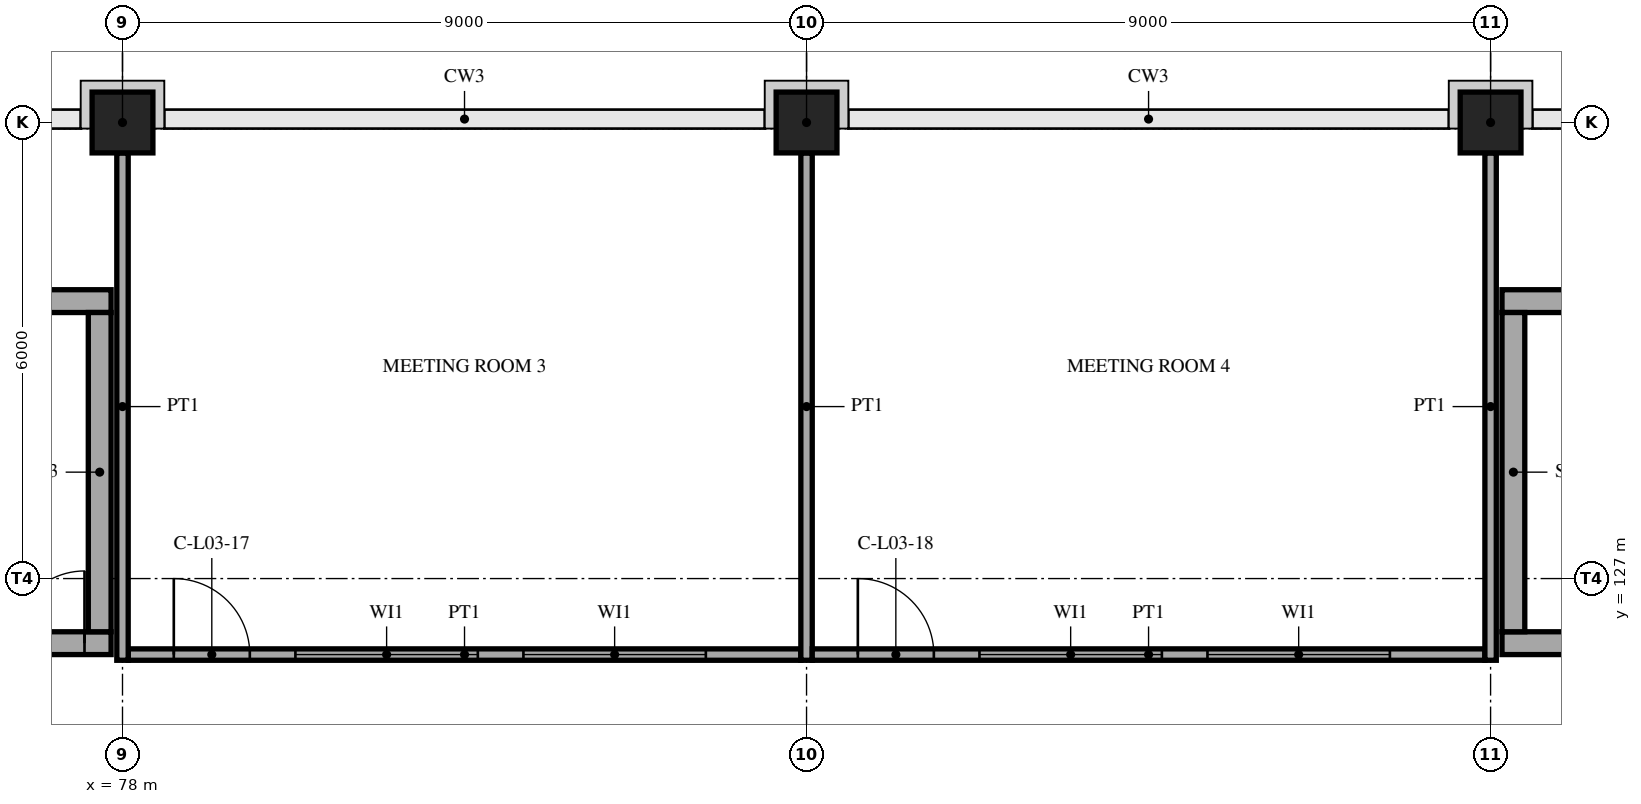
"""IFC4 building model, lengths in metres.
Left out: names, types, materials, properties, quantities, classifications, styles, units other than length and angle.
Written with IfcOpenShell. Run it as: python <this file> out.ifc"""

import sys

from ifc_helpers import new_model, si_unit, direction, frame, frame_2d, origin, origin_2d, place, context, subcontext, project, spatial, rectangle, extrude, element, fill, save


model = new_model("IFC4")
c1 = context("Model", 3, precision=1e-05, world=origin(), true_north=direction((0.0, 1.0)))
c2 = subcontext(c1, "Body", "Model", "MODEL_VIEW")
j1 = project(units=[si_unit("LENGTHUNIT", "METRE"), si_unit("PLANEANGLEUNIT", "RADIAN")], contexts=[c1])
p1 = place(None, origin())
s1 = spatial("IfcSite", under=j1, at=p1, CompositionType="ELEMENT")
p2 = place(p1, origin())
s2 = spatial("IfcBuilding", under=s1, at=p2, CompositionType="ELEMENT")
p3 = place(p2, frame((0.0, 0.0, 15.0)))
s3 = spatial("IfcBuildingStorey", under=s2, at=p3, CompositionType="ELEMENT", Elevation=15.0)
for number, where, z_axis, x_axis in (
    (1, (78.0, 133.0, 0.0), (0.0, 0.0, 1.0), (1.0, 0.0, 0.0)),
    (2, (87.0, 133.0, 0.0), (0.0, 0.0, 1.0), (1.0, 0.0, 0.0)),
    (3, (96.0, 133.0, 0.0), (0.0, 0.0, 1.0), (1.0, 0.0, 0.0)),
):
    element("IfcColumn", number, at=place(p3, frame(where, z_axis=z_axis, x_axis=x_axis)), inside=s3, PredefinedType="COLUMN", context=c2, shape_type="SweptSolid", body=[
        extrude(rectangle(XDim=0.8, YDim=0.8, at=origin_2d()), origin(), (0.0, 0.0, 1.0), 4.2),
    ])
p4 = place(p3, frame((69.15, 126.15, 0.0), z_axis=(0.0, 0.0, 1.0), x_axis=(1.0, 0.0, 0.0)))
e4 = element("IfcWall", 4, at=p4, inside=s3, PredefinedType="SHEAR", context=c2, shape_type="SweptSolid", body=[
    extrude(rectangle(XDim=8.7, YDim=0.3, at=frame_2d((4.35, 0.0))), origin(), (0.0, 0.0, 1.0), 4.2),
])
p5 = place(p4, frame((6.45, 0.0, 0.0)))
e5 = element("IfcOpeningElement", 5, at=p5, cuts=e4, PredefinedType="OPENING", context=c2, shape_type="SweptSolid", body=[
    extrude(rectangle(XDim=1.9, YDim=2.1, at=frame_2d((0.95, 1.05))), frame((0.0, 0.16, 0.0), z_axis=(0.0, -1.0, 0.0), x_axis=(1.0, 0.0, 0.0)), (0.0, 0.0, 1.0), 0.32),
])
p6 = place(p3, frame((69.15, 130.65, 0.0), z_axis=(0.0, 0.0, 1.0), x_axis=(1.0, 0.0, 0.0)))
e6 = element("IfcWall", 6, at=p6, inside=s3, PredefinedType="SHEAR", context=c2, shape_type="SweptSolid", body=[
    extrude(rectangle(XDim=8.7, YDim=0.3, at=frame_2d((4.35, 0.0))), origin(), (0.0, 0.0, 1.0), 4.2),
])
p7 = place(p3, frame((77.7, 126.3, 0.0), z_axis=(0.0, 0.0, 1.0), x_axis=(0.0, 1.0, 0.0)))
e7 = element("IfcWall", 7, at=p7, inside=s3, PredefinedType="SHEAR", context=c2, shape_type="SweptSolid", body=[
    extrude(rectangle(XDim=4.2, YDim=0.3, at=frame_2d((2.1, 0.0))), origin(), (0.0, 0.0, 1.0), 4.2),
])
p8 = place(p3, frame((96.15, 126.15, 0.0), z_axis=(0.0, 0.0, 1.0), x_axis=(1.0, 0.0, 0.0)))
e8 = element("IfcWall", 8, at=p8, inside=s3, PredefinedType="SHEAR", context=c2, shape_type="SweptSolid", body=[
    extrude(rectangle(XDim=8.2, YDim=0.3, at=frame_2d((4.1, 0.0))), origin(), (0.0, 0.0, 1.0), 4.2),
])
p9 = place(p8, frame((5.95, 0.0, 0.0)))
e9 = element("IfcOpeningElement", 9, at=p9, cuts=e8, PredefinedType="OPENING", context=c2, shape_type="SweptSolid", body=[
    extrude(rectangle(XDim=1.9, YDim=2.1, at=frame_2d((0.95, 1.05))), frame((0.0, 0.16, 0.0), z_axis=(0.0, -1.0, 0.0), x_axis=(1.0, 0.0, 0.0)), (0.0, 0.0, 1.0), 0.32),
])
p10 = place(p3, frame((96.15, 130.65, 0.0), z_axis=(0.0, 0.0, 1.0), x_axis=(1.0, 0.0, 0.0)))
e10 = element("IfcWall", 10, at=p10, inside=s3, PredefinedType="SHEAR", context=c2, shape_type="SweptSolid", body=[
    extrude(rectangle(XDim=8.2, YDim=0.3, at=frame_2d((4.1, 0.0))), origin(), (0.0, 0.0, 1.0), 4.2),
])
p11 = place(p3, frame((96.3, 126.3, 0.0), z_axis=(0.0, 0.0, 1.0), x_axis=(0.0, 1.0, 0.0)))
e11 = element("IfcWall", 11, at=p11, inside=s3, PredefinedType="SHEAR", context=c2, shape_type="SweptSolid", body=[
    extrude(rectangle(XDim=4.2, YDim=0.3, at=frame_2d((2.1, 0.0))), origin(), (0.0, 0.0, 1.0), 4.2),
])
p12 = place(p3, frame((78.075, 126.0, 0.0), z_axis=(0.0, 0.0, 1.0), x_axis=(1.0, 0.0, 0.0)))
e12 = element("IfcWall", 12, at=p12, inside=s3, PredefinedType="PARTITIONING", context=c2, shape_type="SweptSolid", body=[
    extrude(rectangle(XDim=8.85, YDim=0.15, at=frame_2d((4.425, 0.0))), origin(), (0.0, 0.0, 1.0), 4.2),
])
p13 = place(p12, frame((0.6, 0.0, 0.0)))
e13 = element("IfcOpeningElement", 13, at=p13, cuts=e12, PredefinedType="OPENING", context=c2, shape_type="SweptSolid", body=[
    extrude(rectangle(XDim=1.0, YDim=2.1, at=frame_2d((0.5, 1.05))), frame((0.0, 0.085, 0.0), z_axis=(0.0, -1.0, 0.0), x_axis=(1.0, 0.0, 0.0)), (0.0, 0.0, 1.0), 0.17),
])
p14 = place(p12, frame((2.2, 0.0, 0.9)))
e14 = element("IfcOpeningElement", 14, at=p14, cuts=e12, PredefinedType="OPENING", context=c2, shape_type="SweptSolid", body=[
    extrude(rectangle(XDim=2.4, YDim=1.5, at=frame_2d((1.2, 0.75))), frame((0.0, 0.085, 0.0), z_axis=(0.0, -1.0, 0.0), x_axis=(1.0, 0.0, 0.0)), (0.0, 0.0, 1.0), 0.17),
])
p15 = place(p12, frame((5.2, 0.0, 0.9)))
e15 = element("IfcOpeningElement", 15, at=p15, cuts=e12, PredefinedType="OPENING", context=c2, shape_type="SweptSolid", body=[
    extrude(rectangle(XDim=2.4, YDim=1.5, at=frame_2d((1.2, 0.75))), frame((0.0, 0.085, 0.0), z_axis=(0.0, -1.0, 0.0), x_axis=(1.0, 0.0, 0.0)), (0.0, 0.0, 1.0), 0.17),
])
for number, where, z_axis, x_axis in (
    (16, (78.0, 125.925, 0.0), (0.0, 0.0, 1.0), (0.0, 1.0, 0.0)),
    (17, (87.0, 125.925, 0.0), (0.0, 0.0, 1.0), (0.0, 1.0, 0.0)),
):
    element("IfcWall", number, at=place(p3, frame(where, z_axis=z_axis, x_axis=x_axis)), inside=s3, PredefinedType="PARTITIONING", context=c2, shape_type="SweptSolid", body=[
        extrude(rectangle(XDim=6.675, YDim=0.15, at=frame_2d((3.337, 0.0))), origin(), (0.0, 0.0, 1.0), 4.2),
    ])
p16 = place(p3, frame((87.075, 126.0, 0.0), z_axis=(0.0, 0.0, 1.0), x_axis=(1.0, 0.0, 0.0)))
e18 = element("IfcWall", 18, at=p16, inside=s3, PredefinedType="PARTITIONING", context=c2, shape_type="SweptSolid", body=[
    extrude(rectangle(XDim=8.85, YDim=0.15, at=frame_2d((4.425, 0.0))), origin(), (0.0, 0.0, 1.0), 4.2),
])
p17 = place(p16, frame((0.6, 0.0, 0.0)))
e19 = element("IfcOpeningElement", 19, at=p17, cuts=e18, PredefinedType="OPENING", context=c2, shape_type="SweptSolid", body=[
    extrude(rectangle(XDim=1.0, YDim=2.1, at=frame_2d((0.5, 1.05))), frame((0.0, 0.085, 0.0), z_axis=(0.0, -1.0, 0.0), x_axis=(1.0, 0.0, 0.0)), (0.0, 0.0, 1.0), 0.17),
])
p18 = place(p16, frame((2.2, 0.0, 0.9)))
e20 = element("IfcOpeningElement", 20, at=p18, cuts=e18, PredefinedType="OPENING", context=c2, shape_type="SweptSolid", body=[
    extrude(rectangle(XDim=2.4, YDim=1.5, at=frame_2d((1.2, 0.75))), frame((0.0, 0.085, 0.0), z_axis=(0.0, -1.0, 0.0), x_axis=(1.0, 0.0, 0.0)), (0.0, 0.0, 1.0), 0.17),
])
p19 = place(p16, frame((5.2, 0.0, 0.9)))
e21 = element("IfcOpeningElement", 21, at=p19, cuts=e18, PredefinedType="OPENING", context=c2, shape_type="SweptSolid", body=[
    extrude(rectangle(XDim=2.4, YDim=1.5, at=frame_2d((1.2, 0.75))), frame((0.0, 0.085, 0.0), z_axis=(0.0, -1.0, 0.0), x_axis=(1.0, 0.0, 0.0)), (0.0, 0.0, 1.0), 0.17),
])
p20 = place(p3, frame((96.0, 125.925, 0.0), z_axis=(0.0, 0.0, 1.0), x_axis=(0.0, 1.0, 0.0)))
e22 = element("IfcWall", 22, at=p20, inside=s3, PredefinedType="PARTITIONING", context=c2, shape_type="SweptSolid", body=[
    extrude(rectangle(XDim=6.675, YDim=0.15, at=frame_2d((3.337, 0.0))), origin(), (0.0, 0.0, 1.0), 4.2),
])
p21 = place(p5, origin())
e23 = element("IfcDoor", 23, at=p21, inside=s3, OperationType="DOUBLE_DOOR_SINGLE_SWING", PredefinedType="NOTDEFINED", context=c2, shape_type="SweptSolid", body=[
    extrude(rectangle(XDim=1.9, YDim=2.1, at=frame_2d((0.95, 1.05))), frame((0.0, 0.025, 0.0), z_axis=(0.0, -1.0, 0.0), x_axis=(1.0, 0.0, 0.0)), (0.0, 0.0, 1.0), 0.05),
])
fill(e5, e23)
p22 = place(p13, origin())
e24 = element("IfcDoor", 24, at=p22, inside=s3, OperationType="SINGLE_SWING_LEFT", PredefinedType="NOTDEFINED", context=c2, shape_type="SweptSolid", body=[
    extrude(rectangle(XDim=1.0, YDim=2.1, at=frame_2d((0.5, 1.05))), frame((0.0, 0.025, 0.0), z_axis=(0.0, -1.0, 0.0), x_axis=(1.0, 0.0, 0.0)), (0.0, 0.0, 1.0), 0.05),
])
fill(e13, e24)
p23 = place(p14, origin())
e25 = element("IfcWindow", 25, at=p23, inside=s3, PartitioningType="SINGLE_PANEL", PredefinedType="WINDOW", context=c2, shape_type="SweptSolid", body=[
    extrude(rectangle(XDim=2.4, YDim=1.5, at=frame_2d((1.2, 0.75))), frame((0.0, 0.03, 0.0), z_axis=(0.0, -1.0, 0.0), x_axis=(1.0, 0.0, 0.0)), (0.0, 0.0, 1.0), 0.06),
])
fill(e14, e25)
p24 = place(p15, origin())
e26 = element("IfcWindow", 26, at=p24, inside=s3, PartitioningType="SINGLE_PANEL", PredefinedType="WINDOW", context=c2, shape_type="SweptSolid", body=[
    extrude(rectangle(XDim=2.4, YDim=1.5, at=frame_2d((1.2, 0.75))), frame((0.0, 0.03, 0.0), z_axis=(0.0, -1.0, 0.0), x_axis=(1.0, 0.0, 0.0)), (0.0, 0.0, 1.0), 0.06),
])
fill(e15, e26)
p25 = place(p17, origin())
e27 = element("IfcDoor", 27, at=p25, inside=s3, OperationType="SINGLE_SWING_LEFT", PredefinedType="NOTDEFINED", context=c2, shape_type="SweptSolid", body=[
    extrude(rectangle(XDim=1.0, YDim=2.1, at=frame_2d((0.5, 1.05))), frame((0.0, 0.025, 0.0), z_axis=(0.0, -1.0, 0.0), x_axis=(1.0, 0.0, 0.0)), (0.0, 0.0, 1.0), 0.05),
])
fill(e19, e27)
p26 = place(p18, origin())
e28 = element("IfcWindow", 28, at=p26, inside=s3, PartitioningType="SINGLE_PANEL", PredefinedType="WINDOW", context=c2, shape_type="SweptSolid", body=[
    extrude(rectangle(XDim=2.4, YDim=1.5, at=frame_2d((1.2, 0.75))), frame((0.0, 0.03, 0.0), z_axis=(0.0, -1.0, 0.0), x_axis=(1.0, 0.0, 0.0)), (0.0, 0.0, 1.0), 0.06),
])
fill(e20, e28)
p27 = place(p19, origin())
e29 = element("IfcWindow", 29, at=p27, inside=s3, PartitioningType="SINGLE_PANEL", PredefinedType="WINDOW", context=c2, shape_type="SweptSolid", body=[
    extrude(rectangle(XDim=2.4, YDim=1.5, at=frame_2d((1.2, 0.75))), frame((0.0, 0.03, 0.0), z_axis=(0.0, -1.0, 0.0), x_axis=(1.0, 0.0, 0.0)), (0.0, 0.0, 1.0), 0.06),
])
fill(e21, e29)
save(model, sys.argv[1])
